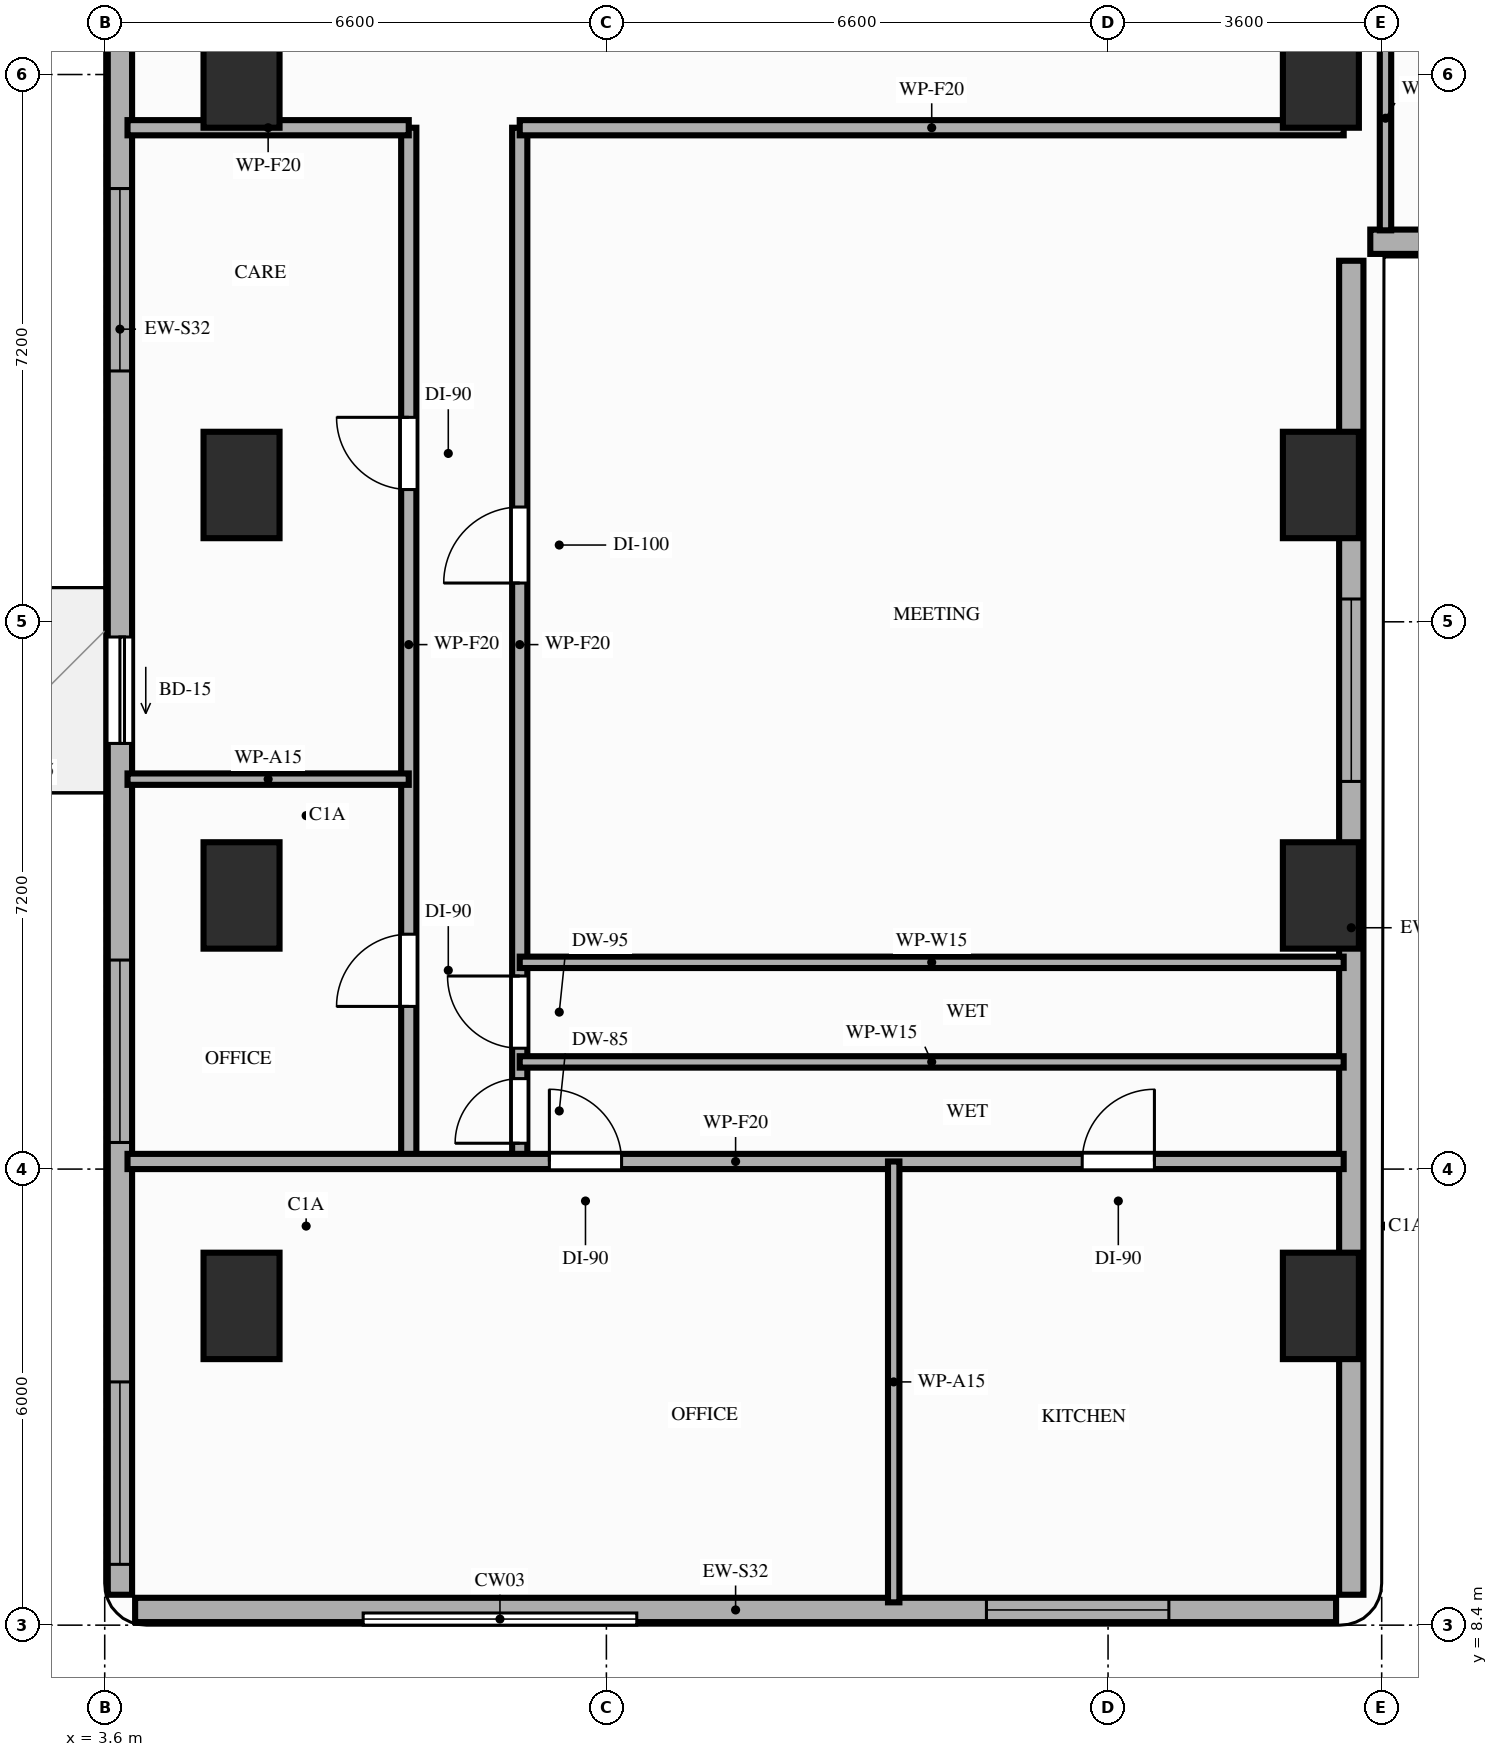
"""IFC4 building model, lengths in metres.
Left out: names, types, materials, properties, quantities, classifications, styles, units other than length and angle.
Written with IfcOpenShell. Run it as: python <this file> out.ifc"""

import sys

from ifc_helpers import new_model, si_unit, direction, frame, frame_2d, origin, origin_2d, place, context, subcontext, project, spatial, rectangle, extrude, element, fill, save


model = new_model("IFC4")
c1 = context("Model", 3, precision=1e-05, world=origin(), true_north=direction((0.0, 1.0)))
c2 = subcontext(c1, "Body", "Model", "MODEL_VIEW")
j1 = project(units=[si_unit("LENGTHUNIT", "METRE"), si_unit("PLANEANGLEUNIT", "RADIAN")], contexts=[c1])
p1 = place(None, origin())
s1 = spatial("IfcSite", under=j1, at=p1, CompositionType="ELEMENT")
p2 = place(p1, origin())
s2 = spatial("IfcBuilding", under=s1, at=p2, CompositionType="ELEMENT")
p3 = place(p2, frame((0.0, 0.0, 46.8)))
s3 = spatial("IfcBuildingStorey", under=s2, at=p3, CompositionType="ELEMENT", Elevation=46.8)
for number, where, z_axis, x_axis in (
    (1, (5.4, 12.6, 0.0), (0.0, 0.0, 1.0), (1.0, 0.0, 0.0)),
    (2, (19.6, 12.6, 0.0), (0.0, 0.0, 1.0), (1.0, 0.0, 0.0)),
    (3, (5.4, 18.0, 0.0), (0.0, 0.0, 1.0), (1.0, 0.0, 0.0)),
    (4, (19.6, 18.0, 0.0), (0.0, 0.0, 1.0), (1.0, 0.0, 0.0)),
    (5, (5.4, 23.4, 0.0), (0.0, 0.0, 1.0), (1.0, 0.0, 0.0)),
    (6, (19.6, 23.4, 0.0), (0.0, 0.0, 1.0), (1.0, 0.0, 0.0)),
    (7, (5.4, 28.8, 0.0), (0.0, 0.0, 1.0), (1.0, 0.0, 0.0)),
    (8, (19.6, 28.8, 0.0), (0.0, 0.0, 1.0), (1.0, 0.0, 0.0)),
):
    element("IfcColumn", number, at=place(p3, frame(where, z_axis=z_axis, x_axis=x_axis)), inside=s3, PredefinedType="COLUMN", context=c2, shape_type="SweptSolid", body=[
        extrude(rectangle(XDim=1.0, YDim=1.4, at=origin_2d()), origin(), (0.0, 0.0, 1.0), 3.2),
    ])
p4 = place(p3, frame((4.0, 8.6, 0.0), z_axis=(0.0, 0.0, 1.0), x_axis=(1.0, 0.0, 0.0)))
e9 = element("IfcWall", 9, at=p4, inside=s3, PredefinedType="STANDARD", context=c2, shape_type="SweptSolid", body=[
    extrude(rectangle(XDim=15.8, YDim=0.32, at=frame_2d((7.9, 0.0))), origin(), (0.0, 0.0, 1.0), 3.02),
])
p5 = place(p4, frame((11.2, 0.0, 0.85)))
e10 = element("IfcOpeningElement", 10, at=p5, cuts=e9, PredefinedType="OPENING", context=c2, shape_type="SweptSolid", body=[
    extrude(rectangle(XDim=2.4, YDim=1.8, at=frame_2d((1.2, 0.9))), frame((0.0, 0.17, 0.0), z_axis=(0.0, -1.0, 0.0), x_axis=(1.0, 0.0, 0.0)), (0.0, 0.0, 1.0), 0.34),
])
p6 = place(p3, frame((3.8, 42.1, 0.0), z_axis=(0.0, 0.0, 1.0), x_axis=(0.0, -1.0, 0.0)))
e11 = element("IfcWall", 11, at=p6, inside=s3, PredefinedType="STANDARD", context=c2, shape_type="SweptSolid", body=[
    extrude(rectangle(XDim=33.3, YDim=0.32, at=frame_2d((16.65, 0.0))), origin(), (0.0, 0.0, 1.0), 2.7),
])
p7 = place(p6, frame((20.7, 0.0, 0.0)))
e12 = element("IfcOpeningElement", 12, at=p7, cuts=e11, PredefinedType="OPENING", context=c2, shape_type="SweptSolid", body=[
    extrude(rectangle(XDim=1.4, YDim=2.1, at=frame_2d((0.7, 1.05))), frame((0.0, 0.17, 0.0), z_axis=(0.0, -1.0, 0.0), x_axis=(1.0, 0.0, 0.0)), (0.0, 0.0, 1.0), 0.34),
])
p8 = place(p6, frame((30.5, 0.0, 0.85)))
e13 = element("IfcOpeningElement", 13, at=p8, cuts=e11, PredefinedType="OPENING", context=c2, shape_type="SweptSolid", body=[
    extrude(rectangle(XDim=2.4, YDim=1.6, at=frame_2d((1.2, 0.8))), frame((0.0, 0.17, 0.0), z_axis=(0.0, -1.0, 0.0), x_axis=(1.0, 0.0, 0.0)), (0.0, 0.0, 1.0), 0.34),
])
p9 = place(p6, frame((24.95, 0.0, 0.85)))
e14 = element("IfcOpeningElement", 14, at=p9, cuts=e11, PredefinedType="OPENING", context=c2, shape_type="SweptSolid", body=[
    extrude(rectangle(XDim=2.4, YDim=1.6, at=frame_2d((1.2, 0.8))), frame((0.0, 0.17, 0.0), z_axis=(0.0, -1.0, 0.0), x_axis=(1.0, 0.0, 0.0)), (0.0, 0.0, 1.0), 0.34),
])
p10 = place(p6, frame((14.8, 0.0, 0.85)))
e15 = element("IfcOpeningElement", 15, at=p10, cuts=e11, PredefinedType="OPENING", context=c2, shape_type="SweptSolid", body=[
    extrude(rectangle(XDim=2.4, YDim=1.6, at=frame_2d((1.2, 0.8))), frame((0.0, 0.17, 0.0), z_axis=(0.0, -1.0, 0.0), x_axis=(1.0, 0.0, 0.0)), (0.0, 0.0, 1.0), 0.34),
])
p11 = place(p6, frame((9.6, 0.0, 0.85)))
e16 = element("IfcOpeningElement", 16, at=p11, cuts=e11, PredefinedType="OPENING", context=c2, shape_type="SweptSolid", body=[
    extrude(rectangle(XDim=2.4, YDim=1.6, at=frame_2d((1.2, 0.8))), frame((0.0, 0.17, 0.0), z_axis=(0.0, -1.0, 0.0), x_axis=(1.0, 0.0, 0.0)), (0.0, 0.0, 1.0), 0.34),
])
p12 = place(p6, frame((3.5, 0.0, 0.85)))
e17 = element("IfcOpeningElement", 17, at=p12, cuts=e11, PredefinedType="OPENING", context=c2, shape_type="SweptSolid", body=[
    extrude(rectangle(XDim=2.4, YDim=1.6, at=frame_2d((1.2, 0.8))), frame((0.0, 0.17, 0.0), z_axis=(0.0, -1.0, 0.0), x_axis=(1.0, 0.0, 0.0)), (0.0, 0.0, 1.0), 0.34),
])
p13 = place(p3, frame((20.0, 8.8, 0.0), z_axis=(0.0, 0.0, 1.0), x_axis=(0.0, 1.0, 0.0)))
e18 = element("IfcWall", 18, at=p13, inside=s3, PredefinedType="STANDARD", context=c2, shape_type="SweptSolid", body=[
    extrude(rectangle(XDim=17.55, YDim=0.32, at=frame_2d((8.775, 0.0))), origin(), (0.0, 0.0, 1.0), 2.41),
])
p14 = place(p13, frame((10.7, 0.0, 0.85)))
e19 = element("IfcOpeningElement", 19, at=p14, cuts=e18, PredefinedType="OPENING", context=c2, shape_type="SweptSolid", body=[
    extrude(rectangle(XDim=2.4, YDim=1.31, at=frame_2d((1.2, 0.655))), frame((0.0, 0.17, 0.0), z_axis=(0.0, -1.0, 0.0), x_axis=(1.0, 0.0, 0.0)), (0.0, 0.0, 1.0), 0.34),
])
p15 = place(p3, frame((20.25, 26.6, 0.0), z_axis=(0.0, 0.0, 1.0), x_axis=(1.0, 0.0, 0.0)))
e20 = element("IfcWall", 20, at=p15, inside=s3, PredefinedType="STANDARD", context=c2, shape_type="SweptSolid", body=[
    extrude(rectangle(XDim=26.15, YDim=0.32, at=frame_2d((13.075, 0.0))), origin(), (0.0, 0.0, 1.0), 3.02),
])
p16 = place(p15, frame((7.95, 0.0, 0.0)))
e21 = element("IfcOpeningElement", 21, at=p16, cuts=e20, PredefinedType="OPENING", context=c2, shape_type="SweptSolid", body=[
    extrude(rectangle(XDim=1.4, YDim=2.1, at=frame_2d((0.7, 1.05))), frame((0.0, 0.17, 0.0), z_axis=(0.0, -1.0, 0.0), x_axis=(1.0, 0.0, 0.0)), (0.0, 0.0, 1.0), 0.34),
])
p17 = place(p15, frame((23.03, 0.0, 0.0)))
e22 = element("IfcOpeningElement", 22, at=p17, cuts=e20, PredefinedType="OPENING", context=c2, shape_type="SweptSolid", body=[
    extrude(rectangle(XDim=1.4, YDim=2.1, at=frame_2d((0.7, 1.05))), frame((0.0, 0.17, 0.0), z_axis=(0.0, -1.0, 0.0), x_axis=(1.0, 0.0, 0.0)), (0.0, 0.0, 1.0), 0.34),
])
p18 = place(p15, frame((1.95, 0.0, 0.85)))
e23 = element("IfcOpeningElement", 23, at=p18, cuts=e20, PredefinedType="OPENING", context=c2, shape_type="SweptSolid", body=[
    extrude(rectangle(XDim=2.4, YDim=1.8, at=frame_2d((1.2, 0.9))), frame((0.0, 0.17, 0.0), z_axis=(0.0, -1.0, 0.0), x_axis=(1.0, 0.0, 0.0)), (0.0, 0.0, 1.0), 0.34),
])
p19 = place(p3, frame((7.6, 14.5, 0.0), z_axis=(0.0, 0.0, 1.0), x_axis=(0.0, 1.0, 0.0)))
e24 = element("IfcWall", 24, at=p19, inside=s3, PredefinedType="PARTITIONING", context=c2, shape_type="SweptSolid", body=[
    extrude(rectangle(XDim=13.6, YDim=0.2, at=frame_2d((6.8, 0.0))), origin(), (0.0, 0.0, 1.0), 2.41),
])
p20 = place(p19, frame((2.04, 0.0, 0.0)))
e25 = element("IfcOpeningElement", 25, at=p20, cuts=e24, PredefinedType="OPENING", context=c2, shape_type="SweptSolid", body=[
    extrude(rectangle(XDim=0.95, YDim=2.15, at=frame_2d((0.475, 1.075))), frame((0.0, 0.11, 0.0), z_axis=(0.0, -1.0, 0.0), x_axis=(1.0, 0.0, 0.0)), (0.0, 0.0, 1.0), 0.22),
])
p21 = place(p19, frame((8.84, 0.0, 0.0)))
e26 = element("IfcOpeningElement", 26, at=p21, cuts=e24, PredefinedType="OPENING", context=c2, shape_type="SweptSolid", body=[
    extrude(rectangle(XDim=0.95, YDim=2.15, at=frame_2d((0.475, 1.075))), frame((0.0, 0.11, 0.0), z_axis=(0.0, -1.0, 0.0), x_axis=(1.0, 0.0, 0.0)), (0.0, 0.0, 1.0), 0.22),
])
p22 = place(p3, frame((9.06, 14.5, 0.0), z_axis=(0.0, 0.0, 1.0), x_axis=(0.0, 1.0, 0.0)))
e27 = element("IfcWall", 27, at=p22, inside=s3, PredefinedType="PARTITIONING", context=c2, shape_type="SweptSolid", body=[
    extrude(rectangle(XDim=13.6, YDim=0.2, at=frame_2d((6.8, 0.0))), origin(), (0.0, 0.0, 1.0), 2.41),
])
p23 = place(p22, frame((0.24, 0.0, 0.0)))
e28 = element("IfcOpeningElement", 28, at=p23, cuts=e27, PredefinedType="OPENING", context=c2, shape_type="SweptSolid", body=[
    extrude(rectangle(XDim=0.85, YDim=2.1, at=frame_2d((0.425, 1.05))), frame((0.0, 0.11, 0.0), z_axis=(0.0, -1.0, 0.0), x_axis=(1.0, 0.0, 0.0)), (0.0, 0.0, 1.0), 0.22),
])
p24 = place(p22, frame((1.49, 0.0, 0.0)))
e29 = element("IfcOpeningElement", 29, at=p24, cuts=e27, PredefinedType="OPENING", context=c2, shape_type="SweptSolid", body=[
    extrude(rectangle(XDim=0.95, YDim=2.1, at=frame_2d((0.475, 1.05))), frame((0.0, 0.11, 0.0), z_axis=(0.0, -1.0, 0.0), x_axis=(1.0, 0.0, 0.0)), (0.0, 0.0, 1.0), 0.22),
])
p25 = place(p22, frame((7.61, 0.0, 0.0)))
e30 = element("IfcOpeningElement", 30, at=p25, cuts=e27, PredefinedType="OPENING", context=c2, shape_type="SweptSolid", body=[
    extrude(rectangle(XDim=1.0, YDim=2.15, at=frame_2d((0.5, 1.075))), frame((0.0, 0.11, 0.0), z_axis=(0.0, -1.0, 0.0), x_axis=(1.0, 0.0, 0.0)), (0.0, 0.0, 1.0), 0.22),
])
p26 = place(p3, frame((3.9, 14.5, 0.0), z_axis=(0.0, 0.0, 1.0), x_axis=(1.0, 0.0, 0.0)))
e31 = element("IfcWall", 31, at=p26, inside=s3, PredefinedType="PARTITIONING", context=c2, shape_type="SweptSolid", body=[
    extrude(rectangle(XDim=16.0, YDim=0.2, at=frame_2d((8.0, 0.0))), origin(), (0.0, 0.0, 1.0), 2.41),
])
p27 = place(p26, frame((5.55, 0.0, 0.0)))
e32 = element("IfcOpeningElement", 32, at=p27, cuts=e31, PredefinedType="OPENING", context=c2, shape_type="SweptSolid", body=[
    extrude(rectangle(XDim=0.95, YDim=2.15, at=frame_2d((0.475, 1.075))), frame((0.0, 0.11, 0.0), z_axis=(0.0, -1.0, 0.0), x_axis=(1.0, 0.0, 0.0)), (0.0, 0.0, 1.0), 0.22),
])
p28 = place(p26, frame((12.56, 0.0, 0.0)))
e33 = element("IfcOpeningElement", 33, at=p28, cuts=e31, PredefinedType="OPENING", context=c2, shape_type="SweptSolid", body=[
    extrude(rectangle(XDim=0.95, YDim=2.15, at=frame_2d((0.475, 1.075))), frame((0.0, 0.11, 0.0), z_axis=(0.0, -1.0, 0.0), x_axis=(1.0, 0.0, 0.0)), (0.0, 0.0, 1.0), 0.22),
])
p29 = place(p3, frame((3.9, 28.1, 0.0), z_axis=(0.0, 0.0, 1.0), x_axis=(1.0, 0.0, 0.0)))
e34 = element("IfcWall", 34, at=p29, inside=s3, PredefinedType="PARTITIONING", context=c2, shape_type="SweptSolid", body=[
    extrude(rectangle(XDim=3.7, YDim=0.2, at=frame_2d((1.85, 0.0))), origin(), (0.0, 0.0, 1.0), 2.41),
])
p30 = place(p3, frame((9.06, 28.1, 0.0), z_axis=(0.0, 0.0, 1.0), x_axis=(1.0, 0.0, 0.0)))
e35 = element("IfcWall", 35, at=p30, inside=s3, PredefinedType="PARTITIONING", context=c2, shape_type="SweptSolid", body=[
    extrude(rectangle(XDim=10.84, YDim=0.2, at=frame_2d((5.42, 0.0))), origin(), (0.0, 0.0, 1.0), 2.41),
])
p31 = place(p3, frame((20.45, 26.75, 0.0), z_axis=(0.0, 0.0, 1.0), x_axis=(0.0, 1.0, 0.0)))
e36 = element("IfcWall", 36, at=p31, inside=s3, PredefinedType="PARTITIONING", context=c2, shape_type="SweptSolid", body=[
    extrude(rectangle(XDim=2.95, YDim=0.15, at=frame_2d((1.475, 0.0))), origin(), (0.0, 0.0, 1.0), 2.41),
])
p32 = place(p3, frame((3.9, 19.53, 0.0), z_axis=(0.0, 0.0, 1.0), x_axis=(1.0, 0.0, 0.0)))
e37 = element("IfcWall", 37, at=p32, inside=s3, PredefinedType="PARTITIONING", context=c2, shape_type="SweptSolid", body=[
    extrude(rectangle(XDim=3.7, YDim=0.15, at=frame_2d((1.85, 0.0))), origin(), (0.0, 0.0, 1.0), 2.41),
])
p33 = place(p3, frame((13.98, 8.7, 0.0), z_axis=(0.0, 0.0, 1.0), x_axis=(0.0, 1.0, 0.0)))
e38 = element("IfcWall", 38, at=p33, inside=s3, PredefinedType="PARTITIONING", context=c2, shape_type="SweptSolid", body=[
    extrude(rectangle(XDim=5.8, YDim=0.15, at=frame_2d((2.9, 0.0))), origin(), (0.0, 0.0, 1.0), 2.41),
])
for number, where, z_axis, x_axis in (
    (39, (9.06, 15.81, 0.0), (0.0, 0.0, 1.0), (1.0, 0.0, 0.0)),
    (40, (9.06, 17.12, 0.0), (0.0, 0.0, 1.0), (1.0, 0.0, 0.0)),
):
    element("IfcWall", number, at=place(p3, frame(where, z_axis=z_axis, x_axis=x_axis)), inside=s3, PredefinedType="PARTITIONING", context=c2, shape_type="SweptSolid", body=[
        extrude(rectangle(XDim=10.84, YDim=0.15, at=frame_2d((5.42, 0.0))), origin(), (0.0, 0.0, 1.0), 2.41),
    ])
p34 = place(p7, origin())
e41 = element("IfcDoor", 41, at=p34, inside=s3, OperationType="SLIDING_TO_RIGHT", PredefinedType="DOOR", context=c2, shape_type="SweptSolid", body=[
    extrude(rectangle(XDim=1.4, YDim=2.1, at=frame_2d((0.7, 1.05))), frame((0.0, 0.025, 0.0), z_axis=(0.0, -1.0, 0.0), x_axis=(1.0, 0.0, 0.0)), (0.0, 0.0, 1.0), 0.05),
])
fill(e12, e41)
p35 = place(p8, origin())
e42 = element("IfcWindow", 42, at=p35, inside=s3, PartitioningType="SINGLE_PANEL", PredefinedType="WINDOW", context=c2, shape_type="SweptSolid", body=[
    extrude(rectangle(XDim=2.4, YDim=1.6, at=frame_2d((1.2, 0.8))), frame((0.0, 0.03, 0.0), z_axis=(0.0, -1.0, 0.0), x_axis=(1.0, 0.0, 0.0)), (0.0, 0.0, 1.0), 0.06),
])
fill(e13, e42)
p36 = place(p9, origin())
e43 = element("IfcWindow", 43, at=p36, inside=s3, PartitioningType="SINGLE_PANEL", PredefinedType="WINDOW", context=c2, shape_type="SweptSolid", body=[
    extrude(rectangle(XDim=2.4, YDim=1.6, at=frame_2d((1.2, 0.8))), frame((0.0, 0.03, 0.0), z_axis=(0.0, -1.0, 0.0), x_axis=(1.0, 0.0, 0.0)), (0.0, 0.0, 1.0), 0.06),
])
fill(e14, e43)
p37 = place(p10, origin())
e44 = element("IfcWindow", 44, at=p37, inside=s3, PartitioningType="SINGLE_PANEL", PredefinedType="WINDOW", context=c2, shape_type="SweptSolid", body=[
    extrude(rectangle(XDim=2.4, YDim=1.6, at=frame_2d((1.2, 0.8))), frame((0.0, 0.03, 0.0), z_axis=(0.0, -1.0, 0.0), x_axis=(1.0, 0.0, 0.0)), (0.0, 0.0, 1.0), 0.06),
])
fill(e15, e44)
p38 = place(p14, origin())
e45 = element("IfcWindow", 45, at=p38, inside=s3, PartitioningType="SINGLE_PANEL", PredefinedType="WINDOW", context=c2, shape_type="SweptSolid", body=[
    extrude(rectangle(XDim=2.4, YDim=1.31, at=frame_2d((1.2, 0.655))), frame((0.0, 0.03, 0.0), z_axis=(0.0, -1.0, 0.0), x_axis=(1.0, 0.0, 0.0)), (0.0, 0.0, 1.0), 0.06),
])
fill(e19, e45)
p39 = place(p5, origin())
e46 = element("IfcWindow", 46, at=p39, inside=s3, PartitioningType="SINGLE_PANEL", PredefinedType="WINDOW", context=c2, shape_type="SweptSolid", body=[
    extrude(rectangle(XDim=2.4, YDim=1.8, at=frame_2d((1.2, 0.9))), frame((0.0, 0.03, 0.0), z_axis=(0.0, -1.0, 0.0), x_axis=(1.0, 0.0, 0.0)), (0.0, 0.0, 1.0), 0.06),
])
fill(e10, e46)
p40 = place(p20, origin())
e47 = element("IfcDoor", 47, at=p40, inside=s3, OperationType="SINGLE_SWING_LEFT", PredefinedType="DOOR", context=c2, shape_type="SweptSolid", body=[
    extrude(rectangle(XDim=0.95, YDim=2.15, at=frame_2d((0.475, 1.075))), frame((0.0, 0.025, 0.0), z_axis=(0.0, -1.0, 0.0), x_axis=(1.0, 0.0, 0.0)), (0.0, 0.0, 1.0), 0.05),
])
fill(e25, e47)
p41 = place(p21, origin())
e48 = element("IfcDoor", 48, at=p41, inside=s3, OperationType="SINGLE_SWING_RIGHT", PredefinedType="DOOR", context=c2, shape_type="SweptSolid", body=[
    extrude(rectangle(XDim=0.95, YDim=2.15, at=frame_2d((0.475, 1.075))), frame((0.0, 0.025, 0.0), z_axis=(0.0, -1.0, 0.0), x_axis=(1.0, 0.0, 0.0)), (0.0, 0.0, 1.0), 0.05),
])
fill(e26, e48)
p42 = place(p27, origin())
e49 = element("IfcDoor", 49, at=p42, inside=s3, OperationType="SINGLE_SWING_LEFT", PredefinedType="DOOR", context=c2, shape_type="SweptSolid", body=[
    extrude(rectangle(XDim=0.95, YDim=2.15, at=frame_2d((0.475, 1.075))), frame((0.0, 0.025, 0.0), z_axis=(0.0, -1.0, 0.0), x_axis=(1.0, 0.0, 0.0)), (0.0, 0.0, 1.0), 0.05),
])
fill(e32, e49)
p43 = place(p28, origin())
e50 = element("IfcDoor", 50, at=p43, inside=s3, OperationType="SINGLE_SWING_RIGHT", PredefinedType="DOOR", context=c2, shape_type="SweptSolid", body=[
    extrude(rectangle(XDim=0.95, YDim=2.15, at=frame_2d((0.475, 1.075))), frame((0.0, 0.025, 0.0), z_axis=(0.0, -1.0, 0.0), x_axis=(1.0, 0.0, 0.0)), (0.0, 0.0, 1.0), 0.05),
])
fill(e33, e50)
p44 = place(p23, origin())
e51 = element("IfcDoor", 51, at=p44, inside=s3, OperationType="SINGLE_SWING_LEFT", PredefinedType="DOOR", context=c2, shape_type="SweptSolid", body=[
    extrude(rectangle(XDim=0.85, YDim=2.1, at=frame_2d((0.425, 1.05))), frame((0.0, 0.025, 0.0), z_axis=(0.0, -1.0, 0.0), x_axis=(1.0, 0.0, 0.0)), (0.0, 0.0, 1.0), 0.05),
])
fill(e28, e51)
p45 = place(p24, origin())
e52 = element("IfcDoor", 52, at=p45, inside=s3, OperationType="SINGLE_SWING_RIGHT", PredefinedType="DOOR", context=c2, shape_type="SweptSolid", body=[
    extrude(rectangle(XDim=0.95, YDim=2.1, at=frame_2d((0.475, 1.05))), frame((0.0, 0.025, 0.0), z_axis=(0.0, -1.0, 0.0), x_axis=(1.0, 0.0, 0.0)), (0.0, 0.0, 1.0), 0.05),
])
fill(e29, e52)
p46 = place(p25, origin())
e53 = element("IfcDoor", 53, at=p46, inside=s3, OperationType="SINGLE_SWING_LEFT", PredefinedType="DOOR", context=c2, shape_type="SweptSolid", body=[
    extrude(rectangle(XDim=1.0, YDim=2.15, at=frame_2d((0.5, 1.075))), frame((0.0, 0.025, 0.0), z_axis=(0.0, -1.0, 0.0), x_axis=(1.0, 0.0, 0.0)), (0.0, 0.0, 1.0), 0.05),
])
fill(e30, e53)
save(model, sys.argv[1])
